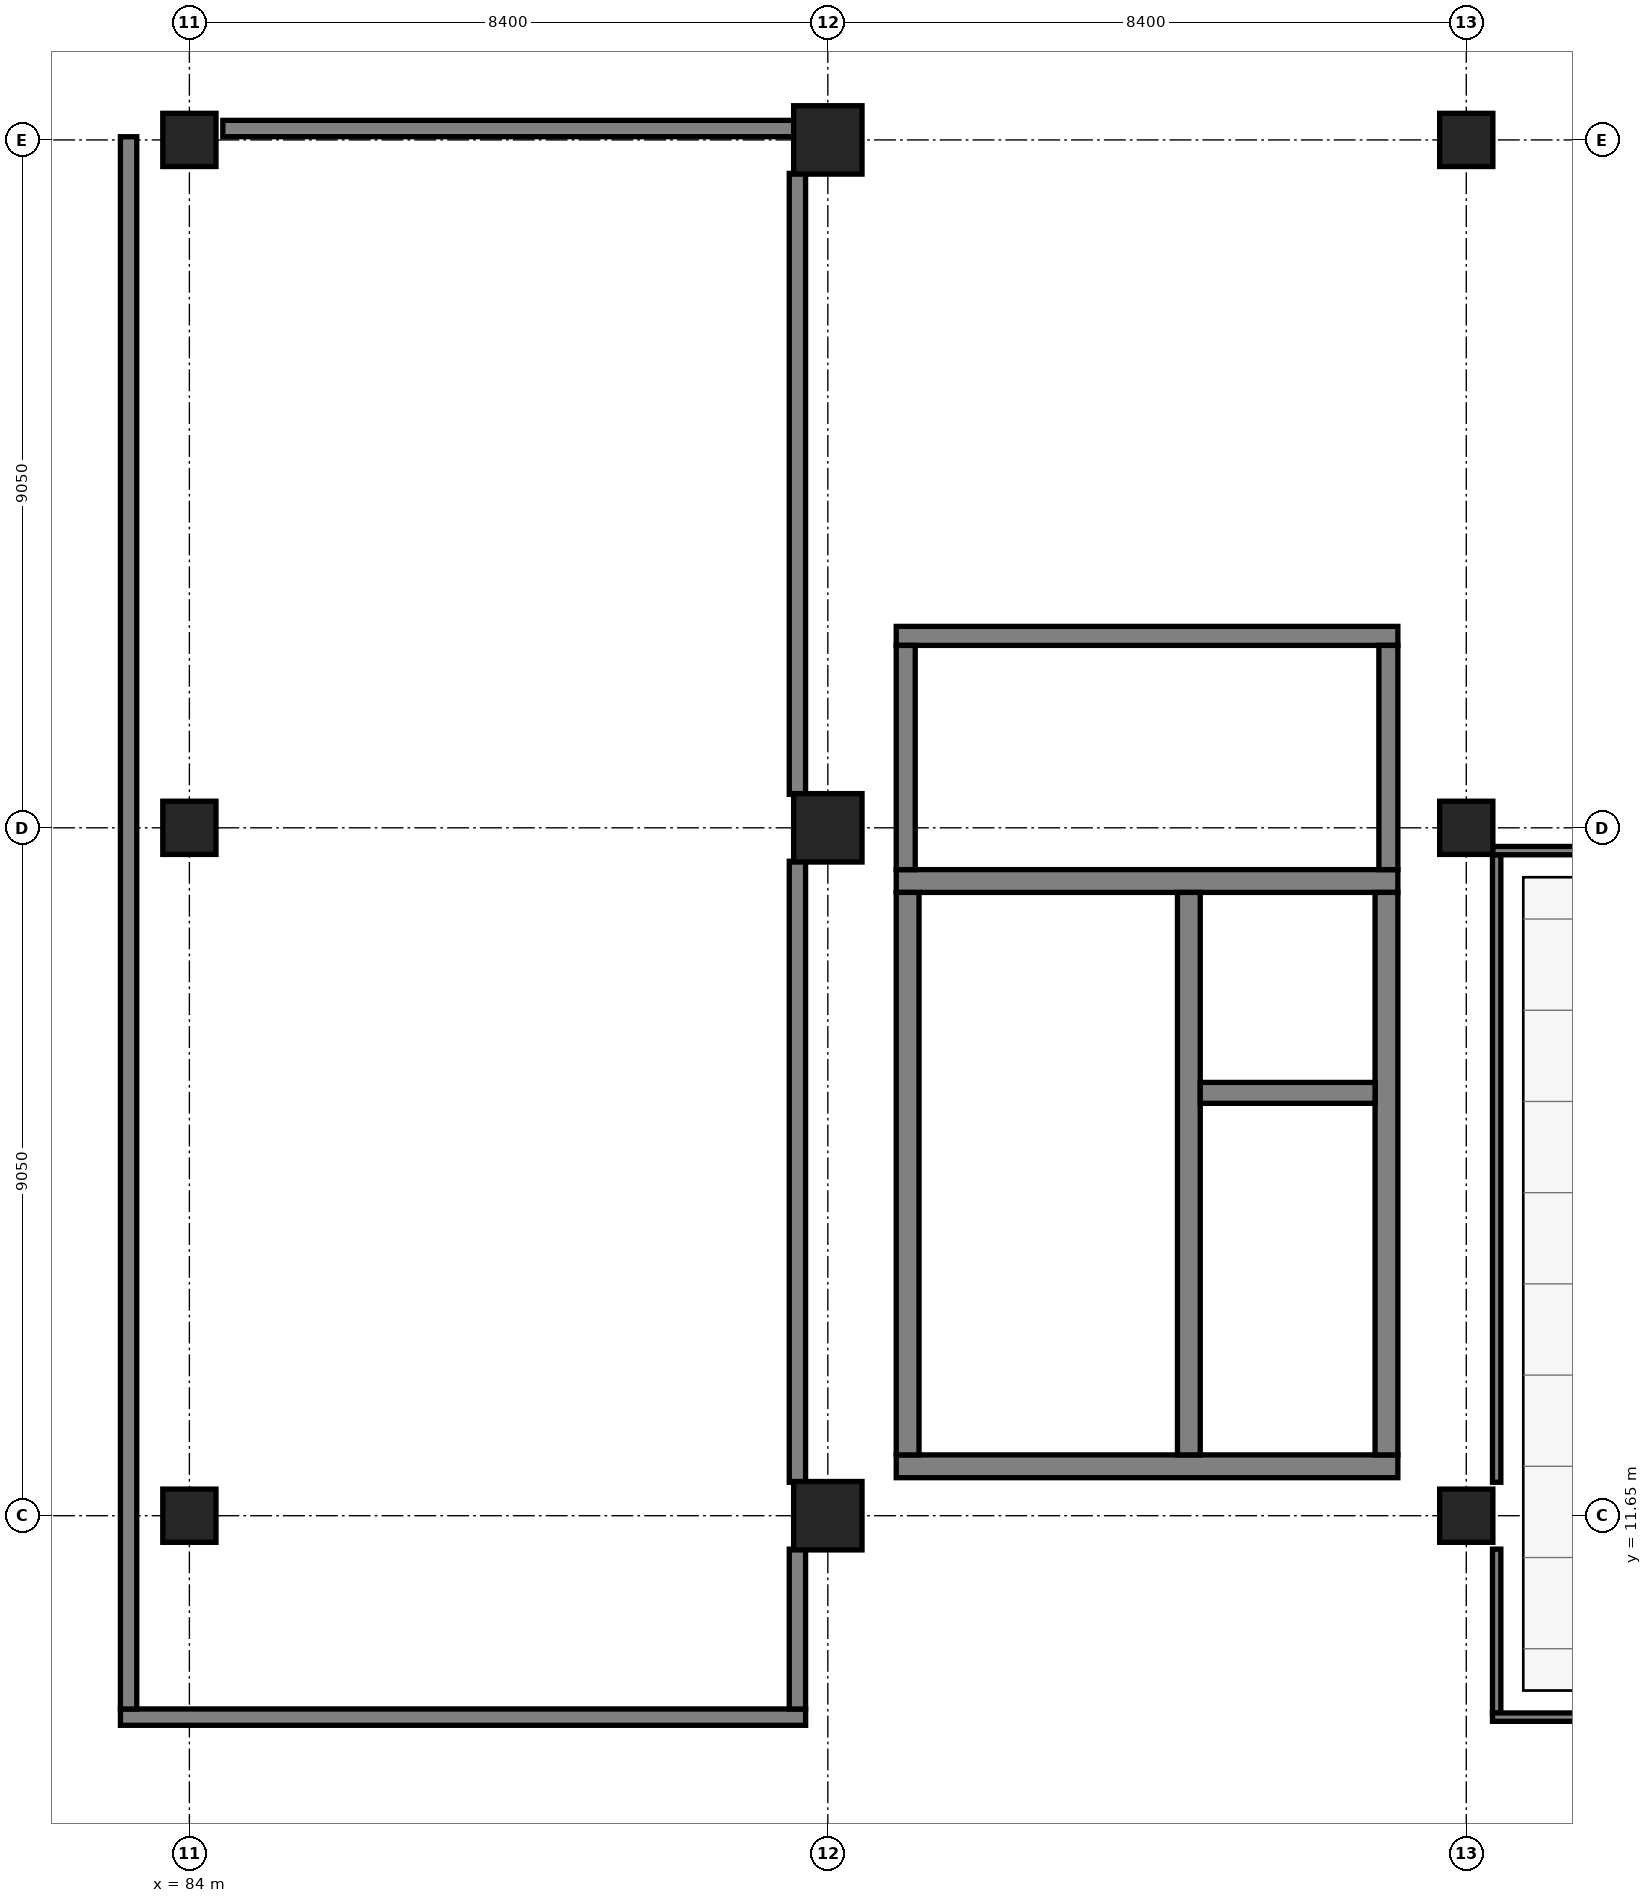
"""IFC4 building model, lengths in metres.
Left out: names, types, materials, properties, quantities, classifications, styles, units other than length and angle.
Written with IfcOpenShell. Run it as: python <this file> out.ifc"""

import sys

from ifc_helpers import new_model, si_unit, direction, frame, frame_2d, origin, origin_2d, place, context, subcontext, project, spatial, rectangle, extrude, element, fill, save


model = new_model("IFC4")
c1 = context("Model", 3, precision=1e-05, world=origin(), true_north=direction((0.0, 1.0)))
c2 = subcontext(c1, "Body", "Model", "MODEL_VIEW")
j1 = project(units=[si_unit("LENGTHUNIT", "METRE"), si_unit("PLANEANGLEUNIT", "RADIAN")], contexts=[c1])
p1 = place(None, origin())
s1 = spatial("IfcSite", under=j1, at=p1, CompositionType="ELEMENT")
p2 = place(p1, origin())
s2 = spatial("IfcBuilding", under=s1, at=p2, CompositionType="ELEMENT")
p3 = place(p2, frame((0.0, 0.0, 5.4)))
s3 = spatial("IfcBuildingStorey", under=s2, at=p3, CompositionType="ELEMENT", Elevation=5.4)
for number, where, z_axis, x_axis in (
    (1, (84.0, 11.65, 0.0), (0.0, 0.0, 1.0), (1.0, 0.0, 0.0)),
    (2, (84.0, 20.7, 0.0), (0.0, 0.0, 1.0), (1.0, 0.0, 0.0)),
    (3, (84.0, 29.75, 0.0), (0.0, 0.0, 1.0), (1.0, 0.0, 0.0)),
):
    element("IfcColumn", number, at=place(p3, frame(where, z_axis=z_axis, x_axis=x_axis)), inside=s3, PredefinedType="COLUMN", context=c2, shape_type="SweptSolid", body=[
        extrude(rectangle(XDim=0.7, YDim=0.7, at=origin_2d()), origin(), (0.0, 0.0, 1.0), 5.4),
    ])
for number, where, z_axis, x_axis in (
    (4, (92.4, 11.65, 0.0), (0.0, 0.0, 1.0), (1.0, 0.0, 0.0)),
    (5, (92.4, 20.7, 0.0), (0.0, 0.0, 1.0), (1.0, 0.0, 0.0)),
    (6, (92.4, 29.75, 0.0), (0.0, 0.0, 1.0), (1.0, 0.0, 0.0)),
):
    element("IfcColumn", number, at=place(p3, frame(where, z_axis=z_axis, x_axis=x_axis)), inside=s3, PredefinedType="COLUMN", context=c2, shape_type="SweptSolid", body=[
        extrude(rectangle(XDim=0.9, YDim=0.9, at=origin_2d()), origin(), (0.0, 0.0, 1.0), 5.4),
    ])
for number, where, z_axis, x_axis in (
    (7, (100.8, 11.65, 0.0), (0.0, 0.0, 1.0), (1.0, 0.0, 0.0)),
    (8, (100.8, 20.7, 0.0), (0.0, 0.0, 1.0), (1.0, 0.0, 0.0)),
    (9, (100.8, 29.75, 0.0), (0.0, 0.0, 1.0), (1.0, 0.0, 0.0)),
):
    element("IfcColumn", number, at=place(p3, frame(where, z_axis=z_axis, x_axis=x_axis)), inside=s3, PredefinedType="COLUMN", context=c2, shape_type="SweptSolid", body=[
        extrude(rectangle(XDim=0.7, YDim=0.7, at=origin_2d()), origin(), (0.0, 0.0, 1.0), 5.4),
    ])
p4 = place(p3, frame((93.3, 12.3, 0.0), z_axis=(0.0, 0.0, 1.0), x_axis=(1.0, 0.0, 0.0)))
e10 = element("IfcWall", 10, at=p4, inside=s3, PredefinedType="SHEAR", context=c2, shape_type="SweptSolid", body=[
    extrude(rectangle(XDim=6.6, YDim=0.3, at=frame_2d((3.3, 0.0))), origin(), (0.0, 0.0, 1.0), 5.1),
])
p5 = place(p3, frame((93.3, 20.0, 0.0), z_axis=(0.0, 0.0, 1.0), x_axis=(1.0, 0.0, 0.0)))
e11 = element("IfcWall", 11, at=p5, inside=s3, PredefinedType="SHEAR", context=c2, shape_type="SweptSolid", body=[
    extrude(rectangle(XDim=6.6, YDim=0.3, at=frame_2d((3.3, 0.0))), origin(), (0.0, 0.0, 1.0), 5.1),
])
p6 = place(p5, frame((1.425, 0.0, 0.0)))
e12 = element("IfcOpeningElement", 12, at=p6, cuts=e11, PredefinedType="OPENING", context=c2, shape_type="SweptSolid", body=[
    extrude(rectangle(XDim=1.15, YDim=2.2, at=frame_2d((0.575, 1.1))), frame((0.0, 0.16, 0.0), z_axis=(0.0, -1.0, 0.0), x_axis=(1.0, 0.0, 0.0)), (0.0, 0.0, 1.0), 0.32),
])
p7 = place(p5, frame((4.55, 0.0, 0.0)))
e13 = element("IfcOpeningElement", 13, at=p7, cuts=e11, PredefinedType="OPENING", context=c2, shape_type="SweptSolid", body=[
    extrude(rectangle(XDim=1.2, YDim=2.15, at=frame_2d((0.6, 1.075))), frame((0.0, 0.16, 0.0), z_axis=(0.0, -1.0, 0.0), x_axis=(1.0, 0.0, 0.0)), (0.0, 0.0, 1.0), 0.32),
])
for number, where, z_axis, x_axis in (
    (14, (93.45, 12.45, 0.0), (0.0, 0.0, 1.0), (0.0, 1.0, 0.0)),
    (15, (99.75, 12.45, 0.0), (0.0, 0.0, 1.0), (0.0, 1.0, 0.0)),
    (16, (97.15, 12.45, 0.0), (0.0, 0.0, 1.0), (0.0, 1.0, 0.0)),
):
    element("IfcWall", number, at=place(p3, frame(where, z_axis=z_axis, x_axis=x_axis)), inside=s3, PredefinedType="SHEAR", context=c2, shape_type="SweptSolid", body=[
        extrude(rectangle(XDim=7.4, YDim=0.3, at=frame_2d((3.7, 0.0))), origin(), (0.0, 0.0, 1.0), 5.1),
    ])
p8 = place(p3, frame((97.3, 17.213, 0.0), z_axis=(0.0, 0.0, 1.0), x_axis=(1.0, 0.0, 0.0)))
e17 = element("IfcWall", 17, at=p8, inside=s3, PredefinedType="SHEAR", context=c2, shape_type="SweptSolid", body=[
    extrude(rectangle(XDim=2.3, YDim=0.275, at=frame_2d((1.15, 0.0))), origin(), (0.0, 0.0, 1.0), 5.1),
])
p9 = place(p3, frame((93.3, 23.225, 0.0), z_axis=(0.0, 0.0, 1.0), x_axis=(1.0, 0.0, 0.0)))
e18 = element("IfcWall", 18, at=p9, inside=s3, PredefinedType="PARTITIONING", context=c2, shape_type="SweptSolid", body=[
    extrude(rectangle(XDim=6.6, YDim=0.25, at=frame_2d((3.3, 0.0))), origin(), (0.0, 0.0, 1.0), 5.1),
])
p10 = place(p9, frame((2.4, 0.0, 0.0)))
e19 = element("IfcOpeningElement", 19, at=p10, cuts=e18, PredefinedType="OPENING", context=c2, shape_type="SweptSolid", body=[
    extrude(rectangle(XDim=1.8, YDim=2.25, at=frame_2d((0.9, 1.125))), frame((0.0, 0.135, 0.0), z_axis=(0.0, -1.0, 0.0), x_axis=(1.0, 0.0, 0.0)), (0.0, 0.0, 1.0), 0.27),
])
for number, where, z_axis, x_axis in (
    (20, (93.425, 20.15, 0.0), (0.0, 0.0, 1.0), (0.0, 1.0, 0.0)),
    (21, (99.775, 20.15, 0.0), (0.0, 0.0, 1.0), (0.0, 1.0, 0.0)),
):
    element("IfcWall", number, at=place(p3, frame(where, z_axis=z_axis, x_axis=x_axis)), inside=s3, PredefinedType="PARTITIONING", context=c2, shape_type="SweptSolid", body=[
        extrude(rectangle(XDim=2.95, YDim=0.25, at=frame_2d((1.475, 0.0))), origin(), (0.0, 0.0, 1.0), 4.33),
    ])
p11 = place(p3, frame((83.093, 9.0, 0.0), z_axis=(0.0, 0.0, 1.0), x_axis=(1.0, 0.0, 0.0)))
e22 = element("IfcWall", 22, at=p11, inside=s3, PredefinedType="PARTITIONING", context=c2, shape_type="SweptSolid", body=[
    extrude(rectangle(XDim=9.015, YDim=0.215, at=frame_2d((4.507, 0.0))), origin(), (0.0, 0.0, 1.0), 4.35),
])
p12 = place(p11, frame((3.618, 0.0, 0.0)))
e23 = element("IfcOpeningElement", 23, at=p12, cuts=e22, PredefinedType="OPENING", context=c2, shape_type="SweptSolid", body=[
    extrude(rectangle(XDim=1.78, YDim=2.38, at=frame_2d((0.89, 1.19))), frame((0.0, 0.118, 0.0), z_axis=(0.0, -1.0, 0.0), x_axis=(1.0, 0.0, 0.0)), (0.0, 0.0, 1.0), 0.235),
])
p13 = place(p11, frame((5.998, 0.0, 1.05)))
e24 = element("IfcOpeningElement", 24, at=p13, cuts=e22, PredefinedType="OPENING", context=c2, shape_type="SweptSolid", body=[
    extrude(rectangle(XDim=1.4, YDim=1.1, at=frame_2d((0.7, 0.55))), frame((0.0, 0.118, 0.0), z_axis=(0.0, -1.0, 0.0), x_axis=(1.0, 0.0, 0.0)), (0.0, 0.0, 1.0), 0.235),
])
p14 = place(p3, frame((84.44, 29.9, 0.0), z_axis=(0.0, 0.0, 1.0), x_axis=(1.0, 0.0, 0.0)))
e25 = element("IfcWall", 25, at=p14, inside=s3, PredefinedType="PARTITIONING", context=c2, shape_type="SweptSolid", body=[
    extrude(rectangle(XDim=7.668, YDim=0.215, at=frame_2d((3.834, 0.0))), origin(), (0.0, 0.0, 1.0), 4.23),
])
p15 = place(p3, frame((92.0, 9.107, 0.0), z_axis=(0.0, 0.0, 1.0), x_axis=(0.0, 1.0, 0.0)))
e26 = element("IfcWall", 26, at=p15, inside=s3, PredefinedType="PARTITIONING", context=c2, shape_type="SweptSolid", body=[
    extrude(rectangle(XDim=2.103, YDim=0.215, at=frame_2d((1.052, 0.0))), origin(), (0.0, 0.0, 1.0), 5.1),
])
p16 = place(p3, frame((92.0, 12.09, 0.0), z_axis=(0.0, 0.0, 1.0), x_axis=(0.0, 1.0, 0.0)))
e27 = element("IfcWall", 27, at=p16, inside=s3, PredefinedType="PARTITIONING", context=c2, shape_type="SweptSolid", body=[
    extrude(rectangle(XDim=8.17, YDim=0.215, at=frame_2d((4.085, 0.0))), origin(), (0.0, 0.0, 1.0), 4.55),
])
p17 = place(p3, frame((92.0, 21.14, 0.0), z_axis=(0.0, 0.0, 1.0), x_axis=(0.0, 1.0, 0.0)))
e28 = element("IfcWall", 28, at=p17, inside=s3, PredefinedType="PARTITIONING", context=c2, shape_type="SweptSolid", body=[
    extrude(rectangle(XDim=8.17, YDim=0.215, at=frame_2d((4.085, 0.0))), origin(), (0.0, 0.0, 1.0), 4.55),
])
p18 = place(p3, frame((83.2, 9.107, 0.0), z_axis=(0.0, 0.0, 1.0), x_axis=(0.0, 1.0, 0.0)))
e29 = element("IfcWall", 29, at=p18, inside=s3, PredefinedType="PARTITIONING", context=c2, shape_type="SweptSolid", body=[
    extrude(rectangle(XDim=20.685, YDim=0.215, at=frame_2d((10.343, 0.0))), origin(), (0.0, 0.0, 1.0), 4.33),
])
p19 = place(p3, frame((101.2, 9.055, 0.0), z_axis=(0.0, 0.0, 1.0), x_axis=(0.0, 1.0, 0.0)))
e30 = element("IfcWall", 30, at=p19, inside=s3, PredefinedType="PARTITIONING", context=c2, shape_type="SweptSolid", body=[
    extrude(rectangle(XDim=2.155, YDim=0.11, at=frame_2d((1.078, 0.0))), origin(), (0.0, 0.0, 1.0), 5.1),
])
p20 = place(p19, frame((0.447, 0.0, 0.0)))
e31 = element("IfcOpeningElement", 31, at=p20, cuts=e30, PredefinedType="OPENING", context=c2, shape_type="SweptSolid", body=[
    extrude(rectangle(XDim=1.26, YDim=2.28, at=frame_2d((0.63, 1.14))), frame((0.0, 0.065, 0.0), z_axis=(0.0, -1.0, 0.0), x_axis=(1.0, 0.0, 0.0)), (0.0, 0.0, 1.0), 0.13),
])
p21 = place(p3, frame((101.2, 12.09, 0.0), z_axis=(0.0, 0.0, 1.0), x_axis=(0.0, 1.0, 0.0)))
e32 = element("IfcWall", 32, at=p21, inside=s3, PredefinedType="PARTITIONING", context=c2, shape_type="SweptSolid", body=[
    extrude(rectangle(XDim=8.255, YDim=0.11, at=frame_2d((4.127, 0.0))), origin(), (0.0, 0.0, 1.0), 4.55),
])
for number, where, z_axis, x_axis in (
    (33, (101.145, 20.4, 0.0), (0.0, 0.0, 1.0), (1.0, 0.0, 0.0)),
    (34, (101.145, 9.0, 0.0), (0.0, 0.0, 1.0), (1.0, 0.0, 0.0)),
):
    element("IfcWall", number, at=place(p3, frame(where, z_axis=z_axis, x_axis=x_axis)), inside=s3, PredefinedType="PARTITIONING", context=c2, shape_type="SweptSolid", body=[
        extrude(rectangle(XDim=7.71, YDim=0.11, at=frame_2d((3.855, 0.0))), origin(), (0.0, 0.0, 1.0), 4.25),
    ])
p22 = place(p6, frame((1.15, 0.0, 0.0), z_axis=(0.0, 0.0, 1.0), x_axis=(-1.0, 0.0, 0.0)))
e35 = element("IfcDoor", 35, at=p22, inside=s3, OperationType="SINGLE_SWING_LEFT", PredefinedType="DOOR", context=c2, shape_type="SweptSolid", body=[
    extrude(rectangle(XDim=1.15, YDim=2.2, at=frame_2d((0.575, 1.1))), frame((0.0, 0.025, 0.0), z_axis=(0.0, -1.0, 0.0), x_axis=(1.0, 0.0, 0.0)), (0.0, 0.0, 1.0), 0.05),
])
fill(e12, e35)
p23 = place(p7, origin())
e36 = element("IfcDoor", 36, at=p23, inside=s3, OperationType="DOUBLE_DOOR_SLIDING", PredefinedType="DOOR", context=c2, shape_type="SweptSolid", body=[
    extrude(rectangle(XDim=1.2, YDim=2.15, at=frame_2d((0.6, 1.075))), frame((0.0, 0.025, 0.0), z_axis=(0.0, -1.0, 0.0), x_axis=(1.0, 0.0, 0.0)), (0.0, 0.0, 1.0), 0.05),
])
fill(e13, e36)
p24 = place(p10, origin())
e37 = element("IfcDoor", 37, at=p24, inside=s3, OperationType="DOUBLE_DOOR_SINGLE_SWING", PredefinedType="DOOR", context=c2, shape_type="SweptSolid", body=[
    extrude(rectangle(XDim=1.8, YDim=2.25, at=frame_2d((0.9, 1.125))), frame((0.0, 0.025, 0.0), z_axis=(0.0, -1.0, 0.0), x_axis=(1.0, 0.0, 0.0)), (0.0, 0.0, 1.0), 0.05),
])
fill(e19, e37)
p25 = place(p12, origin())
e38 = element("IfcDoor", 38, at=p25, inside=s3, OperationType="DOUBLE_DOOR_SINGLE_SWING", PredefinedType="DOOR", context=c2, shape_type="SweptSolid", body=[
    extrude(rectangle(XDim=1.78, YDim=2.38, at=frame_2d((0.89, 1.19))), frame((0.0, 0.025, 0.0), z_axis=(0.0, -1.0, 0.0), x_axis=(1.0, 0.0, 0.0)), (0.0, 0.0, 1.0), 0.05),
])
fill(e23, e38)
p26 = place(p13, origin())
e39 = element("IfcWindow", 39, at=p26, inside=s3, PartitioningType="SINGLE_PANEL", PredefinedType="WINDOW", context=c2, shape_type="SweptSolid", body=[
    extrude(rectangle(XDim=1.4, YDim=1.1, at=frame_2d((0.7, 0.55))), frame((0.0, 0.03, 0.0), z_axis=(0.0, -1.0, 0.0), x_axis=(1.0, 0.0, 0.0)), (0.0, 0.0, 1.0), 0.06),
])
fill(e24, e39)
p27 = place(p20, frame((1.26, 0.0, 0.0), z_axis=(0.0, 0.0, 1.0), x_axis=(-1.0, 0.0, 0.0)))
e40 = element("IfcDoor", 40, at=p27, inside=s3, OperationType="SINGLE_SWING_RIGHT", PredefinedType="DOOR", context=c2, shape_type="SweptSolid", body=[
    extrude(rectangle(XDim=1.26, YDim=2.28, at=frame_2d((0.63, 1.14))), frame((0.0, 0.025, 0.0), z_axis=(0.0, -1.0, 0.0), x_axis=(1.0, 0.0, 0.0)), (0.0, 0.0, 1.0), 0.05),
])
fill(e31, e40)
save(model, sys.argv[1])
